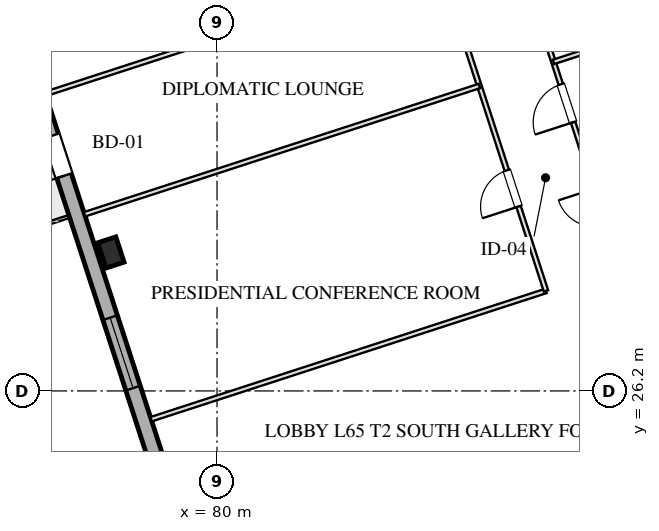
"""IFC4 building model, lengths in metres.
Left out: names, types, materials, properties, quantities, classifications, styles, units other than length and angle.
Written with IfcOpenShell. Run it as: python <this file> out.ifc"""

import sys

from ifc_helpers import new_model, si_unit, direction, frame, frame_2d, origin, origin_2d, place, context, subcontext, project, spatial, rectangle, hollow_rectangle, extrude, element, fill, save


model = new_model("IFC4")
c1 = context("Model", 3, precision=1e-05, world=origin(), true_north=direction((0.0, 1.0)))
c2 = subcontext(c1, "Body", "Model", "MODEL_VIEW")
j1 = project(units=[si_unit("LENGTHUNIT", "METRE"), si_unit("PLANEANGLEUNIT", "RADIAN")], contexts=[c1])
p1 = place(None, origin())
s1 = spatial("IfcSite", under=j1, at=p1, CompositionType="ELEMENT")
p2 = place(p1, origin())
s2 = spatial("IfcBuilding", under=s1, at=p2, CompositionType="ELEMENT")
p3 = place(p2, frame((0.0, 0.0, 240.8)))
s3 = spatial("IfcBuildingStorey", under=s2, at=p3, CompositionType="ELEMENT", Elevation=240.8)
p4 = place(p3, frame((77.208, 29.844, 0.0), z_axis=(0.0, 0.0, 1.0), x_axis=(0.951056516295, 0.309016994375, 0.0)))
e1 = element("IfcColumn", 1, at=p4, inside=s3, PredefinedType="COLUMN", context=c2, shape_type="SweptSolid", body=[
    extrude(hollow_rectangle(XDim=0.5, YDim=0.7, WallThickness=0.025, at=origin_2d()), origin(), (0.0, 0.0, 1.0), 3.201),
])
p5 = place(p3, frame((82.618, 11.414, 0.0), z_axis=(0.0, 0.0, 1.0), x_axis=(-0.309016491071, 0.951056679828, 0.0)))
e2 = element("IfcWall", 2, at=p5, inside=s3, PredefinedType="SOLIDWALL", context=c2, shape_type="SweptSolid", body=[
    extrude(rectangle(XDim=38.4, YDim=0.4, at=frame_2d((19.2, 0.0))), origin(), (0.0, 0.0, 1.0), 2.36),
])
p6 = place(p5, frame((11.825, 0.0, 0.75)))
e3 = element("IfcOpeningElement", 3, at=p6, cuts=e2, PredefinedType="OPENING", context=c2, shape_type="SweptSolid", body=[
    extrude(rectangle(XDim=1.95, YDim=1.21, at=frame_2d((0.975, 0.605))), frame((0.0, 0.21, 0.0), z_axis=(0.0, -1.0, 0.0), x_axis=(1.0, 0.0, 0.0)), (0.0, 0.0, 1.0), 0.42),
])
p7 = place(p5, frame((15.625, 0.0, 0.75)))
e4 = element("IfcOpeningElement", 4, at=p7, cuts=e2, PredefinedType="OPENING", context=c2, shape_type="SweptSolid", body=[
    extrude(rectangle(XDim=1.95, YDim=1.21, at=frame_2d((0.975, 0.605))), frame((0.0, 0.21, 0.0), z_axis=(0.0, -1.0, 0.0), x_axis=(1.0, 0.0, 0.0)), (0.0, 0.0, 1.0), 0.42),
])
p8 = place(p5, frame((21.5, 0.0, 0.0)))
e5 = element("IfcOpeningElement", 5, at=p8, cuts=e2, PredefinedType="OPENING", context=c2, shape_type="SweptSolid", body=[
    extrude(rectangle(XDim=1.1, YDim=2.15, at=frame_2d((0.55, 1.075))), frame((0.0, 0.21, 0.0), z_axis=(0.0, -1.0, 0.0), x_axis=(1.0, 0.0, 0.0)), (0.0, 0.0, 1.0), 0.42),
])
p9 = place(p3, frame((78.266, 25.456, 0.0), z_axis=(0.0, 0.0, 1.0), x_axis=(0.951056072529, 0.309018360142, 0.0)))
e6 = element("IfcWall", 6, at=p9, inside=s3, PredefinedType="PARTITIONING", context=c2, shape_type="SweptSolid", body=[
    extrude(rectangle(XDim=10.925, YDim=0.12, at=frame_2d((5.462, 0.0))), origin(), (0.0, 0.0, 1.0), 2.925),
])
p10 = place(p3, frame((75.485, 34.015, 0.0), z_axis=(0.0, 0.0, 1.0), x_axis=(0.951058206457, 0.309011792544, 0.0)))
e7 = element("IfcWall", 7, at=p10, inside=s3, PredefinedType="PARTITIONING", context=c2, shape_type="SweptSolid", body=[
    extrude(rectangle(XDim=10.925, YDim=0.12, at=frame_2d((5.462, 0.0))), origin(), (0.0, 0.0, 1.0), 2.925),
])
p11 = place(p3, frame((88.656, 28.832, 0.0), z_axis=(0.0, 0.0, 1.0), x_axis=(-0.309000197986, 0.951061973609, 0.0)))
e8 = element("IfcWall", 8, at=p11, inside=s3, PredefinedType="PARTITIONING", context=c2, shape_type="SweptSolid", body=[
    extrude(rectangle(XDim=9.0, YDim=0.12, at=frame_2d((4.5, 0.0))), origin(), (0.0, 0.0, 1.0), 2.925),
])
p12 = place(p11, frame((2.335, 0.0, 0.0)))
e9 = element("IfcOpeningElement", 9, at=p12, cuts=e8, PredefinedType="OPENING", context=c2, shape_type="SweptSolid", body=[
    extrude(rectangle(XDim=1.0, YDim=2.05, at=frame_2d((0.5, 1.025))), frame((0.0, 0.07, 0.0), z_axis=(0.0, -1.0, 0.0), x_axis=(1.0, 0.0, 0.0)), (0.0, 0.0, 1.0), 0.14),
])
p13 = place(p11, frame((6.835, 0.0, 0.0)))
e10 = element("IfcOpeningElement", 10, at=p13, cuts=e8, PredefinedType="OPENING", context=c2, shape_type="SweptSolid", body=[
    extrude(rectangle(XDim=1.0, YDim=2.05, at=frame_2d((0.5, 1.025))), frame((0.0, 0.07, 0.0), z_axis=(0.0, -1.0, 0.0), x_axis=(1.0, 0.0, 0.0)), (0.0, 0.0, 1.0), 0.14),
])
p14 = place(p3, frame((90.606, 29.465, 0.0), z_axis=(0.0, 0.0, 1.0), x_axis=(-0.309024734286, 0.951054001411, 0.0)))
e11 = element("IfcWall", 11, at=p14, inside=s3, PredefinedType="PARTITIONING", context=c2, shape_type="SweptSolid", body=[
    extrude(rectangle(XDim=9.0, YDim=0.12, at=frame_2d((4.5, 0.0))), origin(), (0.0, 0.0, 1.0), 2.925),
])
p15 = place(p14, frame((1.165, 0.0, 0.0)))
e12 = element("IfcOpeningElement", 12, at=p15, cuts=e11, PredefinedType="OPENING", context=c2, shape_type="SweptSolid", body=[
    extrude(rectangle(XDim=1.0, YDim=2.05, at=frame_2d((0.5, 1.025))), frame((0.0, 0.07, 0.0), z_axis=(0.0, -1.0, 0.0), x_axis=(1.0, 0.0, 0.0)), (0.0, 0.0, 1.0), 0.14),
])
p16 = place(p14, frame((4.0, 0.0, 0.0)))
e13 = element("IfcOpeningElement", 13, at=p16, cuts=e11, PredefinedType="OPENING", context=c2, shape_type="SweptSolid", body=[
    extrude(rectangle(XDim=1.05, YDim=2.05, at=frame_2d((0.525, 1.025))), frame((0.0, 0.07, 0.0), z_axis=(0.0, -1.0, 0.0), x_axis=(1.0, 0.0, 0.0)), (0.0, 0.0, 1.0), 0.14),
])
p17 = place(p14, frame((6.835, 0.0, 0.0)))
e14 = element("IfcOpeningElement", 14, at=p17, cuts=e11, PredefinedType="OPENING", context=c2, shape_type="SweptSolid", body=[
    extrude(rectangle(XDim=1.0, YDim=2.05, at=frame_2d((0.5, 1.025))), frame((0.0, 0.07, 0.0), z_axis=(0.0, -1.0, 0.0), x_axis=(1.0, 0.0, 0.0)), (0.0, 0.0, 1.0), 0.14),
])
p18 = place(p3, frame((76.514, 30.848, 0.0), z_axis=(0.0, 0.0, 1.0), x_axis=(0.951056072529, 0.309018360142, 0.0)))
e15 = element("IfcWall", 15, at=p18, inside=s3, PredefinedType="PARTITIONING", context=c2, shape_type="SweptSolid", body=[
    extrude(rectangle(XDim=10.925, YDim=0.12, at=frame_2d((5.462, 0.0))), origin(), (0.0, 0.0, 1.0), 2.925),
])
p19 = place(p3, frame((88.854, 34.858, 0.0), z_axis=(0.0, 0.0, 1.0), x_axis=(0.951058110432, 0.309012088082, 0.0)))
e16 = element("IfcWall", 16, at=p19, inside=s3, PredefinedType="PARTITIONING", context=c2, shape_type="SweptSolid", body=[
    extrude(rectangle(XDim=14.625, YDim=0.12, at=frame_2d((7.312, 0.0))), origin(), (0.0, 0.0, 1.0), 2.925),
])
p20 = place(p7, origin())
e17 = element("IfcWindow", 17, at=p20, inside=s3, PartitioningType="TRIPLE_PANEL_VERTICAL", PredefinedType="WINDOW", context=c2, shape_type="SweptSolid", body=[
    extrude(rectangle(XDim=1.95, YDim=1.21, at=frame_2d((0.975, 0.605))), frame((0.0, 0.03, 0.0), z_axis=(0.0, -1.0, 0.0), x_axis=(1.0, 0.0, 0.0)), (0.0, 0.0, 1.0), 0.06),
])
fill(e4, e17)
p21 = place(p8, origin())
e18 = element("IfcDoor", 18, at=p21, inside=s3, OperationType="SINGLE_SWING_LEFT", PredefinedType="DOOR", context=c2, shape_type="SweptSolid", body=[
    extrude(rectangle(XDim=1.1, YDim=2.15, at=frame_2d((0.55, 1.075))), frame((0.0, 0.025, 0.0), z_axis=(0.0, -1.0, 0.0), x_axis=(1.0, 0.0, 0.0)), (0.0, 0.0, 1.0), 0.05),
])
fill(e5, e18)
p22 = place(p12, origin())
e19 = element("IfcDoor", 19, at=p22, inside=s3, OperationType="SINGLE_SWING_LEFT", PredefinedType="DOOR", context=c2, shape_type="SweptSolid", body=[
    extrude(rectangle(XDim=1.0, YDim=2.05, at=frame_2d((0.5, 1.025))), frame((0.0, 0.025, 0.0), z_axis=(0.0, -1.0, 0.0), x_axis=(1.0, 0.0, 0.0)), (0.0, 0.0, 1.0), 0.05),
])
fill(e9, e19)
p23 = place(p16, origin())
e20 = element("IfcDoor", 20, at=p23, inside=s3, OperationType="SINGLE_SWING_LEFT", PredefinedType="DOOR", context=c2, shape_type="SweptSolid", body=[
    extrude(rectangle(XDim=1.05, YDim=2.05, at=frame_2d((0.525, 1.025))), frame((0.0, 0.025, 0.0), z_axis=(0.0, -1.0, 0.0), x_axis=(1.0, 0.0, 0.0)), (0.0, 0.0, 1.0), 0.05),
])
fill(e13, e20)
save(model, sys.argv[1])
